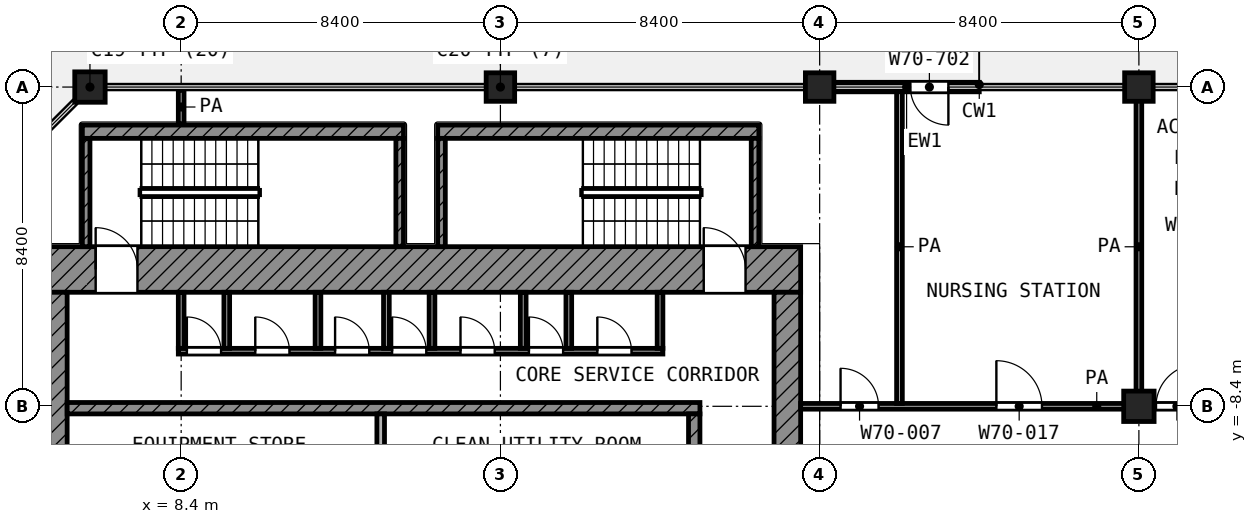
"""IFC4 building model, lengths in metres.
Left out: names, types, materials, properties, quantities, classifications, styles, units other than length and angle.
Written with IfcOpenShell. Run it as: python <this file> out.ifc"""

import sys

from ifc_helpers import new_model, si_unit, direction, frame, frame_2d, origin, origin_2d, place, context, subcontext, project, spatial, rectangle, extrude, element, fill, save


model = new_model("IFC4")
c1 = context("Model", 3, precision=1e-05, world=origin(), true_north=direction((0.0, 1.0)))
c2 = subcontext(c1, "Body", "Model", "MODEL_VIEW")
j1 = project(units=[si_unit("LENGTHUNIT", "METRE"), si_unit("PLANEANGLEUNIT", "RADIAN")], contexts=[c1])
p1 = place(None, origin())
s1 = spatial("IfcSite", under=j1, at=p1, CompositionType="ELEMENT")
p2 = place(p1, origin())
s2 = spatial("IfcBuilding", under=s1, at=p2, CompositionType="ELEMENT")
p3 = place(p2, frame((0.0, 0.0, 302.8)))
s3 = spatial("IfcBuildingStorey", under=s2, at=p3, CompositionType="ELEMENT", Elevation=302.8)
p4 = place(p3, frame((6.0, 0.0, 0.0), z_axis=(0.0, 0.0, 1.0), x_axis=(1.0, 0.0, 0.0)))
e1 = element("IfcColumn", 1, at=p4, inside=s3, PredefinedType="COLUMN", context=c2, shape_type="SweptSolid", body=[
    extrude(rectangle(XDim=0.8, YDim=0.8, at=origin_2d()), origin(), (0.0, 0.0, 1.0), 4.2),
])
for number, where, z_axis, x_axis in (
    (2, (16.8, 0.0, 0.0), (0.0, 0.0, 1.0), (1.0, 0.0, 0.0)),
    (3, (25.2, 0.0, 0.0), (0.0, 0.0, 1.0), (1.0, 0.0, 0.0)),
    (4, (33.6, 0.0, 0.0), (0.0, 0.0, 1.0), (1.0, 0.0, 0.0)),
):
    element("IfcColumn", number, at=place(p3, frame(where, z_axis=z_axis, x_axis=x_axis)), inside=s3, PredefinedType="COLUMN", context=c2, shape_type="SweptSolid", body=[
        extrude(rectangle(XDim=0.75, YDim=0.75, at=origin_2d()), origin(), (0.0, 0.0, 1.0), 4.2),
    ])
p5 = place(p3, frame((33.6, -8.4, 0.0), z_axis=(0.0, 0.0, 1.0), x_axis=(1.0, 0.0, 0.0)))
e5 = element("IfcColumn", 5, at=p5, inside=s3, PredefinedType="COLUMN", context=c2, shape_type="SweptSolid", body=[
    extrude(rectangle(XDim=0.8, YDim=0.8, at=origin_2d()), origin(), (0.0, 0.0, 1.0), 4.2),
])
p6 = place(p3, frame((29.4, 0.0, 0.0), z_axis=(0.0, 0.0, 1.0), x_axis=(-1.0, 0.0, 0.0)))
e6 = element("IfcWall", 6, at=p6, inside=s3, PredefinedType="SOLIDWALL", context=c2, shape_type="SweptSolid", body=[
    extrude(rectangle(XDim=3.825, YDim=0.25, at=frame_2d((1.913, 0.0))), origin(), (0.0, 0.0, 1.0), 3.48),
])
p7 = place(p6, frame((0.812, 0.0, 0.0)))
e7 = element("IfcOpeningElement", 7, at=p7, cuts=e6, PredefinedType="OPENING", context=c2, shape_type="SweptSolid", body=[
    extrude(rectangle(XDim=1.0, YDim=2.1, at=frame_2d((0.5, 1.05))), frame((0.0, 0.135, 0.0), z_axis=(0.0, -1.0, 0.0), x_axis=(1.0, 0.0, 0.0)), (0.0, 0.0, 1.0), 0.27),
])
p8 = place(p3, frame((4.2, -4.8, 0.0), z_axis=(0.0, 0.0, 1.0), x_axis=(1.0, 0.0, 0.0)))
e8 = element("IfcWall", 8, at=p8, inside=s3, PredefinedType="SHEAR", context=c2, shape_type="SweptSolid", body=[
    extrude(rectangle(XDim=20.5, YDim=1.2, at=frame_2d((10.25, 0.0))), origin(), (0.0, 0.0, 1.0), 3.6),
])
p9 = place(p8, frame((1.95, 0.0, 0.0)))
e9 = element("IfcOpeningElement", 9, at=p9, cuts=e8, PredefinedType="OPENING", context=c2, shape_type="SweptSolid", body=[
    extrude(rectangle(XDim=1.1, YDim=2.1, at=frame_2d((0.55, 1.05))), frame((0.0, 0.61, 0.0), z_axis=(0.0, -1.0, 0.0), x_axis=(1.0, 0.0, 0.0)), (0.0, 0.0, 1.0), 1.22),
])
p10 = place(p8, frame((17.95, 0.0, 0.0)))
e10 = element("IfcOpeningElement", 10, at=p10, cuts=e8, PredefinedType="OPENING", context=c2, shape_type="SweptSolid", body=[
    extrude(rectangle(XDim=1.1, YDim=2.1, at=frame_2d((0.55, 1.05))), frame((0.0, 0.61, 0.0), z_axis=(0.0, -1.0, 0.0), x_axis=(1.0, 0.0, 0.0)), (0.0, 0.0, 1.0), 1.22),
])
p11 = place(p3, frame((4.8, -24.7, 0.0), z_axis=(0.0, 0.0, 1.0), x_axis=(0.0, 1.0, 0.0)))
e11 = element("IfcWall", 11, at=p11, inside=s3, PredefinedType="SHEAR", context=c2, shape_type="SweptSolid", body=[
    extrude(rectangle(XDim=19.3, YDim=1.2, at=frame_2d((9.65, 0.0))), origin(), (0.0, 0.0, 1.0), 3.6),
])
p12 = place(p11, frame((11.15, 0.0, 0.0)))
e12 = element("IfcOpeningElement", 12, at=p12, cuts=e11, PredefinedType="OPENING", context=c2, shape_type="SweptSolid", body=[
    extrude(rectangle(XDim=1.1, YDim=2.1, at=frame_2d((0.55, 1.05))), frame((0.0, 0.61, 0.0), z_axis=(0.0, -1.0, 0.0), x_axis=(1.0, 0.0, 0.0)), (0.0, 0.0, 1.0), 1.22),
])
p13 = place(p11, frame((1.85, 0.0, 0.0)))
e13 = element("IfcOpeningElement", 13, at=p13, cuts=e11, PredefinedType="OPENING", context=c2, shape_type="SweptSolid", body=[
    extrude(rectangle(XDim=1.1, YDim=2.1, at=frame_2d((0.55, 1.05))), frame((0.0, 0.61, 0.0), z_axis=(0.0, -1.0, 0.0), x_axis=(1.0, 0.0, 0.0)), (0.0, 0.0, 1.0), 1.22),
])
p14 = place(p3, frame((24.35, -24.0, 0.0), z_axis=(0.0, 0.0, 1.0), x_axis=(0.0, 1.0, 0.0)))
e14 = element("IfcWall", 14, at=p14, inside=s3, PredefinedType="SHEAR", context=c2, shape_type="SweptSolid", body=[
    extrude(rectangle(XDim=18.6, YDim=0.7, at=frame_2d((9.3, 0.0))), origin(), (0.0, 0.0, 1.0), 3.6),
])
p15 = place(p14, frame((10.5, 0.0, 0.0)))
e15 = element("IfcOpeningElement", 15, at=p15, cuts=e14, PredefinedType="OPENING", context=c2, shape_type="SweptSolid", body=[
    extrude(rectangle(XDim=1.8, YDim=2.1, at=frame_2d((0.9, 1.05))), frame((0.0, 0.36, 0.0), z_axis=(0.0, -1.0, 0.0), x_axis=(1.0, 0.0, 0.0)), (0.0, 0.0, 1.0), 0.72),
])
p16 = place(p3, frame((5.4, -8.45, 0.0), z_axis=(0.0, 0.0, 1.0), x_axis=(1.0, 0.0, 0.0)))
e16 = element("IfcWall", 16, at=p16, inside=s3, PredefinedType="SHEAR", context=c2, shape_type="SweptSolid", body=[
    extrude(rectangle(XDim=16.65, YDim=0.3, at=frame_2d((8.325, 0.0))), origin(), (0.0, 0.0, 1.0), 3.6),
])
p17 = place(p3, frame((21.9, -10.95, 0.0), z_axis=(0.0, 0.0, 1.0), x_axis=(0.0, 1.0, 0.0)))
e17 = element("IfcWall", 17, at=p17, inside=s3, PredefinedType="SHEAR", context=c2, shape_type="SweptSolid", body=[
    extrude(rectangle(XDim=2.35, YDim=0.3, at=frame_2d((1.175, 0.0))), origin(), (0.0, 0.0, 1.0), 3.6),
])
p18 = place(p3, frame((13.65, -10.95, 0.0), z_axis=(0.0, 0.0, 1.0), x_axis=(0.0, 1.0, 0.0)))
e18 = element("IfcWall", 18, at=p18, inside=s3, PredefinedType="PARTITIONING", context=c2, shape_type="SweptSolid", body=[
    extrude(rectangle(XDim=2.35, YDim=0.2, at=frame_2d((1.175, 0.0))), origin(), (0.0, 0.0, 1.0), 3.6),
])
p19 = place(p3, frame((8.325, -6.95, 0.0), z_axis=(0.0, 0.0, 1.0), x_axis=(1.0, 0.0, 0.0)))
e19 = element("IfcWall", 19, at=p19, inside=s3, PredefinedType="PARTITIONING", context=c2, shape_type="SweptSolid", body=[
    extrude(rectangle(XDim=12.75, YDim=0.15, at=frame_2d((6.375, 0.0))), origin(), (0.0, 0.0, 1.0), 3.6),
])
p20 = place(p19, frame((0.225, 0.0, 0.0)))
e20 = element("IfcOpeningElement", 20, at=p20, cuts=e19, PredefinedType="OPENING", context=c2, shape_type="SweptSolid", body=[
    extrude(rectangle(XDim=0.9, YDim=2.1, at=frame_2d((0.45, 1.05))), frame((0.0, 0.085, 0.0), z_axis=(0.0, -1.0, 0.0), x_axis=(1.0, 0.0, 0.0)), (0.0, 0.0, 1.0), 0.17),
])
p21 = place(p19, frame((2.025, 0.0, 0.0)))
e21 = element("IfcOpeningElement", 21, at=p21, cuts=e19, PredefinedType="OPENING", context=c2, shape_type="SweptSolid", body=[
    extrude(rectangle(XDim=0.9, YDim=2.1, at=frame_2d((0.45, 1.05))), frame((0.0, 0.085, 0.0), z_axis=(0.0, -1.0, 0.0), x_axis=(1.0, 0.0, 0.0)), (0.0, 0.0, 1.0), 0.17),
])
p22 = place(p19, frame((4.125, 0.0, 0.0)))
e22 = element("IfcOpeningElement", 22, at=p22, cuts=e19, PredefinedType="OPENING", context=c2, shape_type="SweptSolid", body=[
    extrude(rectangle(XDim=0.9, YDim=2.1, at=frame_2d((0.45, 1.05))), frame((0.0, 0.085, 0.0), z_axis=(0.0, -1.0, 0.0), x_axis=(1.0, 0.0, 0.0)), (0.0, 0.0, 1.0), 0.17),
])
p23 = place(p19, frame((5.625, 0.0, 0.0)))
e23 = element("IfcOpeningElement", 23, at=p23, cuts=e19, PredefinedType="OPENING", context=c2, shape_type="SweptSolid", body=[
    extrude(rectangle(XDim=0.9, YDim=2.1, at=frame_2d((0.45, 1.05))), frame((0.0, 0.085, 0.0), z_axis=(0.0, -1.0, 0.0), x_axis=(1.0, 0.0, 0.0)), (0.0, 0.0, 1.0), 0.17),
])
p24 = place(p19, frame((7.425, 0.0, 0.0)))
e24 = element("IfcOpeningElement", 24, at=p24, cuts=e19, PredefinedType="OPENING", context=c2, shape_type="SweptSolid", body=[
    extrude(rectangle(XDim=0.9, YDim=2.1, at=frame_2d((0.45, 1.05))), frame((0.0, 0.085, 0.0), z_axis=(0.0, -1.0, 0.0), x_axis=(1.0, 0.0, 0.0)), (0.0, 0.0, 1.0), 0.17),
])
p25 = place(p19, frame((9.225, 0.0, 0.0)))
e25 = element("IfcOpeningElement", 25, at=p25, cuts=e19, PredefinedType="OPENING", context=c2, shape_type="SweptSolid", body=[
    extrude(rectangle(XDim=0.9, YDim=2.1, at=frame_2d((0.45, 1.05))), frame((0.0, 0.085, 0.0), z_axis=(0.0, -1.0, 0.0), x_axis=(1.0, 0.0, 0.0)), (0.0, 0.0, 1.0), 0.17),
])
p26 = place(p19, frame((11.025, 0.0, 0.0)))
e26 = element("IfcOpeningElement", 26, at=p26, cuts=e19, PredefinedType="OPENING", context=c2, shape_type="SweptSolid", body=[
    extrude(rectangle(XDim=0.9, YDim=2.1, at=frame_2d((0.45, 1.05))), frame((0.0, 0.085, 0.0), z_axis=(0.0, -1.0, 0.0), x_axis=(1.0, 0.0, 0.0)), (0.0, 0.0, 1.0), 0.17),
])
for number, where, z_axis, x_axis in (
    (27, (8.4, -6.875, 0.0), (0.0, 0.0, 1.0), (0.0, 1.0, 0.0)),
    (28, (9.6, -6.875, 0.0), (0.0, 0.0, 1.0), (0.0, 1.0, 0.0)),
    (29, (12.0, -6.875, 0.0), (0.0, 0.0, 1.0), (0.0, 1.0, 0.0)),
    (30, (13.8, -6.875, 0.0), (0.0, 0.0, 1.0), (0.0, 1.0, 0.0)),
    (31, (15.0, -6.875, 0.0), (0.0, 0.0, 1.0), (0.0, 1.0, 0.0)),
    (32, (17.4, -6.875, 0.0), (0.0, 0.0, 1.0), (0.0, 1.0, 0.0)),
    (33, (18.6, -6.875, 0.0), (0.0, 0.0, 1.0), (0.0, 1.0, 0.0)),
    (34, (21.0, -6.875, 0.0), (0.0, 0.0, 1.0), (0.0, 1.0, 0.0)),
):
    element("IfcWall", number, at=place(p3, frame(where, z_axis=z_axis, x_axis=x_axis)), inside=s3, PredefinedType="PARTITIONING", context=c2, shape_type="SweptSolid", body=[
        extrude(rectangle(XDim=1.475, YDim=0.15, at=frame_2d((0.738, 0.0))), origin(), (0.0, 0.0, 1.0), 3.6),
    ])
p27 = place(p3, frame((5.8, -1.175, 0.0), z_axis=(0.0, 0.0, 1.0), x_axis=(1.0, 0.0, 0.0)))
e35 = element("IfcWall", 35, at=p27, inside=s3, PredefinedType="SHEAR", context=c2, shape_type="SweptSolid", body=[
    extrude(rectangle(XDim=8.45, YDim=0.35, at=frame_2d((4.225, 0.0))), origin(), (0.0, 0.0, 1.0), 3.6),
])
for number, where, z_axis, x_axis in (
    (36, (5.9, -4.2, 0.0), (0.0, 0.0, 1.0), (0.0, 1.0, 0.0)),
    (37, (14.15, -4.2, 0.0), (0.0, 0.0, 1.0), (0.0, 1.0, 0.0)),
):
    element("IfcWall", number, at=place(p3, frame(where, z_axis=z_axis, x_axis=x_axis)), inside=s3, PredefinedType="SHEAR", context=c2, shape_type="SweptSolid", body=[
        extrude(rectangle(XDim=2.85, YDim=0.2, at=frame_2d((1.425, 0.0))), origin(), (0.0, 0.0, 1.0), 3.6),
    ])
p28 = place(p3, frame((15.15, -1.175, 0.0), z_axis=(0.0, 0.0, 1.0), x_axis=(1.0, 0.0, 0.0)))
e38 = element("IfcWall", 38, at=p28, inside=s3, PredefinedType="SHEAR", context=c2, shape_type="SweptSolid", body=[
    extrude(rectangle(XDim=8.45, YDim=0.35, at=frame_2d((4.225, 0.0))), origin(), (0.0, 0.0, 1.0), 3.6),
])
for number, where, z_axis, x_axis in (
    (39, (15.25, -4.2, 0.0), (0.0, 0.0, 1.0), (0.0, 1.0, 0.0)),
    (40, (23.5, -4.2, 0.0), (0.0, 0.0, 1.0), (0.0, 1.0, 0.0)),
):
    element("IfcWall", number, at=place(p3, frame(where, z_axis=z_axis, x_axis=x_axis)), inside=s3, PredefinedType="SHEAR", context=c2, shape_type="SweptSolid", body=[
        extrude(rectangle(XDim=2.85, YDim=0.2, at=frame_2d((1.425, 0.0))), origin(), (0.0, 0.0, 1.0), 3.6),
    ])
p29 = place(p3, frame((24.7, -8.4, 0.0), z_axis=(0.0, 0.0, 1.0), x_axis=(1.0, 0.0, 0.0)))
e41 = element("IfcWall", 41, at=p29, inside=s3, PredefinedType="PARTITIONING", context=c2, shape_type="SweptSolid", body=[
    extrude(rectangle(XDim=15.582, YDim=0.15, at=frame_2d((7.791, 0.0))), origin(), (0.0, 0.0, 1.0), 3.6),
])
p30 = place(p29, frame((9.35, 0.0, 0.0)))
e42 = element("IfcOpeningElement", 42, at=p30, cuts=e41, PredefinedType="OPENING", context=c2, shape_type="SweptSolid", body=[
    extrude(rectangle(XDim=1.1, YDim=2.1, at=frame_2d((0.55, 1.05))), frame((0.0, 0.085, 0.0), z_axis=(0.0, -1.0, 0.0), x_axis=(1.0, 0.0, 0.0)), (0.0, 0.0, 1.0), 0.17),
])
p31 = place(p29, frame((1.05, 0.0, 0.0)))
e43 = element("IfcOpeningElement", 43, at=p31, cuts=e41, PredefinedType="OPENING", context=c2, shape_type="SweptSolid", body=[
    extrude(rectangle(XDim=1.0, YDim=2.1, at=frame_2d((0.5, 1.05))), frame((0.0, 0.085, 0.0), z_axis=(0.0, -1.0, 0.0), x_axis=(1.0, 0.0, 0.0)), (0.0, 0.0, 1.0), 0.17),
])
p32 = place(p29, frame((5.15, 0.0, 0.0)))
e44 = element("IfcOpeningElement", 44, at=p32, cuts=e41, PredefinedType="OPENING", context=c2, shape_type="SweptSolid", body=[
    extrude(rectangle(XDim=1.2, YDim=2.1, at=frame_2d((0.6, 1.05))), frame((0.0, 0.085, 0.0), z_axis=(0.0, -1.0, 0.0), x_axis=(1.0, 0.0, 0.0)), (0.0, 0.0, 1.0), 0.17),
])
p33 = place(p3, frame((8.4, -0.97, 0.0), z_axis=(0.0, 0.0, 1.0), x_axis=(0.0, 1.0, 0.0)))
e45 = element("IfcWall", 45, at=p33, inside=s3, PredefinedType="PARTITIONING", context=c2, shape_type="SweptSolid", body=[
    extrude(rectangle(XDim=0.89, YDim=0.15, at=frame_2d((0.445, 0.0))), origin(), (0.0, 0.0, 1.0), 3.6),
])
for number, where, z_axis, x_axis in (
    (46, (27.3, -8.325, 0.0), (0.0, 0.0, 1.0), (0.0, 1.0, 0.0)),
    (47, (33.6, -8.325, 0.0), (0.0, 0.0, 1.0), (0.0, 1.0, 0.0)),
):
    element("IfcWall", number, at=place(p3, frame(where, z_axis=z_axis, x_axis=x_axis)), inside=s3, PredefinedType="PARTITIONING", context=c2, shape_type="SweptSolid", body=[
        extrude(rectangle(XDim=8.245, YDim=0.15, at=frame_2d((4.123, 0.0))), origin(), (0.0, 0.0, 1.0), 3.6),
    ])
p34 = place(p7, origin())
e48 = element("IfcDoor", 48, at=p34, inside=s3, OperationType="SINGLE_SWING_LEFT", PredefinedType="DOOR", context=c2, shape_type="SweptSolid", body=[
    extrude(rectangle(XDim=1.0, YDim=2.1, at=frame_2d((0.5, 1.05))), frame((0.0, 0.025, 0.0), z_axis=(0.0, -1.0, 0.0), x_axis=(1.0, 0.0, 0.0)), (0.0, 0.0, 1.0), 0.05),
])
fill(e7, e48)
p35 = place(p9, origin())
e49 = element("IfcDoor", 49, at=p35, inside=s3, OperationType="SINGLE_SWING_LEFT", PredefinedType="DOOR", context=c2, shape_type="SweptSolid", body=[
    extrude(rectangle(XDim=1.1, YDim=2.1, at=frame_2d((0.55, 1.05))), frame((0.0, 0.025, 0.0), z_axis=(0.0, -1.0, 0.0), x_axis=(1.0, 0.0, 0.0)), (0.0, 0.0, 1.0), 0.05),
])
fill(e9, e49)
p36 = place(p10, origin())
e50 = element("IfcDoor", 50, at=p36, inside=s3, OperationType="SINGLE_SWING_LEFT", PredefinedType="DOOR", context=c2, shape_type="SweptSolid", body=[
    extrude(rectangle(XDim=1.1, YDim=2.1, at=frame_2d((0.55, 1.05))), frame((0.0, 0.025, 0.0), z_axis=(0.0, -1.0, 0.0), x_axis=(1.0, 0.0, 0.0)), (0.0, 0.0, 1.0), 0.05),
])
fill(e10, e50)
p37 = place(p20, origin())
e51 = element("IfcDoor", 51, at=p37, inside=s3, OperationType="SINGLE_SWING_LEFT", PredefinedType="DOOR", context=c2, shape_type="SweptSolid", body=[
    extrude(rectangle(XDim=0.9, YDim=2.1, at=frame_2d((0.45, 1.05))), frame((0.0, 0.025, 0.0), z_axis=(0.0, -1.0, 0.0), x_axis=(1.0, 0.0, 0.0)), (0.0, 0.0, 1.0), 0.05),
])
fill(e20, e51)
p38 = place(p21, origin())
e52 = element("IfcDoor", 52, at=p38, inside=s3, OperationType="SINGLE_SWING_LEFT", PredefinedType="DOOR", context=c2, shape_type="SweptSolid", body=[
    extrude(rectangle(XDim=0.9, YDim=2.1, at=frame_2d((0.45, 1.05))), frame((0.0, 0.025, 0.0), z_axis=(0.0, -1.0, 0.0), x_axis=(1.0, 0.0, 0.0)), (0.0, 0.0, 1.0), 0.05),
])
fill(e21, e52)
p39 = place(p22, origin())
e53 = element("IfcDoor", 53, at=p39, inside=s3, OperationType="SINGLE_SWING_LEFT", PredefinedType="DOOR", context=c2, shape_type="SweptSolid", body=[
    extrude(rectangle(XDim=0.9, YDim=2.1, at=frame_2d((0.45, 1.05))), frame((0.0, 0.025, 0.0), z_axis=(0.0, -1.0, 0.0), x_axis=(1.0, 0.0, 0.0)), (0.0, 0.0, 1.0), 0.05),
])
fill(e22, e53)
p40 = place(p23, origin())
e54 = element("IfcDoor", 54, at=p40, inside=s3, OperationType="SINGLE_SWING_LEFT", PredefinedType="DOOR", context=c2, shape_type="SweptSolid", body=[
    extrude(rectangle(XDim=0.9, YDim=2.1, at=frame_2d((0.45, 1.05))), frame((0.0, 0.025, 0.0), z_axis=(0.0, -1.0, 0.0), x_axis=(1.0, 0.0, 0.0)), (0.0, 0.0, 1.0), 0.05),
])
fill(e23, e54)
p41 = place(p24, origin())
e55 = element("IfcDoor", 55, at=p41, inside=s3, OperationType="SINGLE_SWING_LEFT", PredefinedType="DOOR", context=c2, shape_type="SweptSolid", body=[
    extrude(rectangle(XDim=0.9, YDim=2.1, at=frame_2d((0.45, 1.05))), frame((0.0, 0.025, 0.0), z_axis=(0.0, -1.0, 0.0), x_axis=(1.0, 0.0, 0.0)), (0.0, 0.0, 1.0), 0.05),
])
fill(e24, e55)
p42 = place(p25, origin())
e56 = element("IfcDoor", 56, at=p42, inside=s3, OperationType="SINGLE_SWING_LEFT", PredefinedType="DOOR", context=c2, shape_type="SweptSolid", body=[
    extrude(rectangle(XDim=0.9, YDim=2.1, at=frame_2d((0.45, 1.05))), frame((0.0, 0.025, 0.0), z_axis=(0.0, -1.0, 0.0), x_axis=(1.0, 0.0, 0.0)), (0.0, 0.0, 1.0), 0.05),
])
fill(e25, e56)
p43 = place(p26, origin())
e57 = element("IfcDoor", 57, at=p43, inside=s3, OperationType="SINGLE_SWING_LEFT", PredefinedType="DOOR", context=c2, shape_type="SweptSolid", body=[
    extrude(rectangle(XDim=0.9, YDim=2.1, at=frame_2d((0.45, 1.05))), frame((0.0, 0.025, 0.0), z_axis=(0.0, -1.0, 0.0), x_axis=(1.0, 0.0, 0.0)), (0.0, 0.0, 1.0), 0.05),
])
fill(e26, e57)
p44 = place(p30, origin())
e58 = element("IfcDoor", 58, at=p44, inside=s3, OperationType="SINGLE_SWING_RIGHT", PredefinedType="DOOR", context=c2, shape_type="SweptSolid", body=[
    extrude(rectangle(XDim=1.1, YDim=2.1, at=frame_2d((0.55, 1.05))), frame((0.0, 0.025, 0.0), z_axis=(0.0, -1.0, 0.0), x_axis=(1.0, 0.0, 0.0)), (0.0, 0.0, 1.0), 0.05),
])
fill(e42, e58)
p45 = place(p31, origin())
e59 = element("IfcDoor", 59, at=p45, inside=s3, OperationType="SINGLE_SWING_LEFT", PredefinedType="DOOR", context=c2, shape_type="SweptSolid", body=[
    extrude(rectangle(XDim=1.0, YDim=2.1, at=frame_2d((0.5, 1.05))), frame((0.0, 0.025, 0.0), z_axis=(0.0, -1.0, 0.0), x_axis=(1.0, 0.0, 0.0)), (0.0, 0.0, 1.0), 0.05),
])
fill(e43, e59)
p46 = place(p32, origin())
e60 = element("IfcDoor", 60, at=p46, inside=s3, OperationType="SINGLE_SWING_LEFT", PredefinedType="DOOR", context=c2, shape_type="SweptSolid", body=[
    extrude(rectangle(XDim=1.2, YDim=2.1, at=frame_2d((0.6, 1.05))), frame((0.0, 0.025, 0.0), z_axis=(0.0, -1.0, 0.0), x_axis=(1.0, 0.0, 0.0)), (0.0, 0.0, 1.0), 0.05),
])
fill(e44, e60)
save(model, sys.argv[1])
